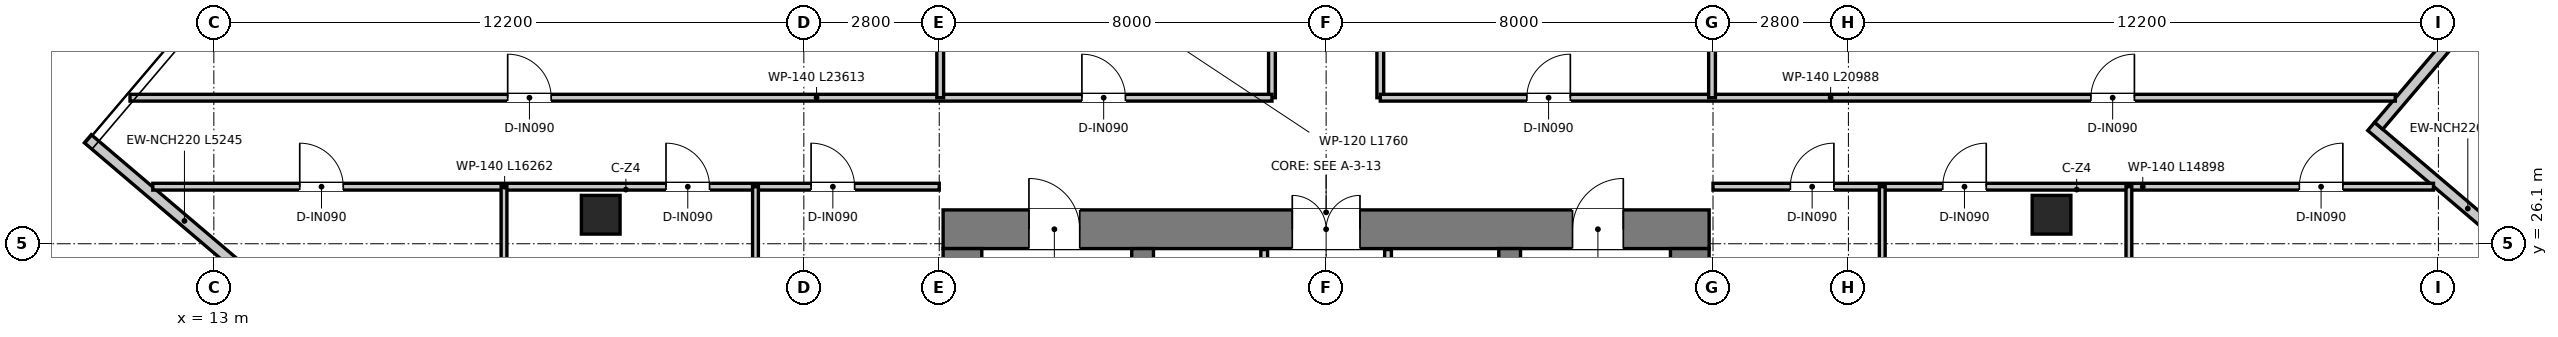
"""IFC4 building model, lengths in metres.
Left out: names, types, materials, properties, quantities, classifications, styles, units other than length and angle.
Written with IfcOpenShell. Run it as: python <this file> out.ifc"""

import sys

from ifc_helpers import new_model, si_unit, direction, frame, frame_2d, origin, origin_2d, place, context, subcontext, project, spatial, rectangle, extrude, source, transform, mapped, element, fill, save


model = new_model("IFC4")
c1 = context("Model", 3, precision=1e-05, world=origin(), true_north=direction((0.0, 1.0)))
c2 = subcontext(c1, "Body", "Model", "MODEL_VIEW")
j1 = project(units=[si_unit("LENGTHUNIT", "METRE"), si_unit("PLANEANGLEUNIT", "RADIAN")], contexts=[c1])
p1 = place(None, origin())
s1 = spatial("IfcSite", under=j1, at=p1, CompositionType="ELEMENT")
p2 = place(p1, origin())
s2 = spatial("IfcBuilding", under=s1, at=p2, CompositionType="ELEMENT")
p3 = place(p2, frame((0.0, 0.0, 211.25)))
s3 = spatial("IfcBuildingStorey", under=s2, at=p3, CompositionType="ELEMENT", Elevation=211.25)
p4 = place(p3, frame((28.08, 26.4, 0.0), z_axis=(0.0, 0.0, 1.0), x_axis=(1.0, 0.0, 0.0)))
e1 = element("IfcWall", 1, at=p4, inside=s3, PredefinedType="SHEAR", context=c2, shape_type="SweptSolid", body=[
    extrude(rectangle(XDim=15.84, YDim=0.8, at=frame_2d((7.92, 0.0))), origin(), (0.0, 0.0, 1.0), 3.95),
])
p5 = place(p4, frame((7.22, 0.0, 0.0)))
e2 = element("IfcOpeningElement", 2, at=p5, cuts=e1, PredefinedType="OPENING", context=c2, shape_type="SweptSolid", body=[
    extrude(rectangle(XDim=1.4, YDim=2.2, at=frame_2d((0.7, 1.1))), frame((0.0, 0.41, 0.0), z_axis=(0.0, -1.0, 0.0), x_axis=(1.0, 0.0, 0.0)), (0.0, 0.0, 1.0), 0.82),
])
p6 = place(p4, frame((1.775, 0.0, 0.0)))
e3 = element("IfcOpeningElement", 3, at=p6, cuts=e1, PredefinedType="OPENING", context=c2, shape_type="SweptSolid", body=[
    extrude(rectangle(XDim=1.05, YDim=2.1, at=frame_2d((0.525, 1.05))), frame((0.0, 0.41, 0.0), z_axis=(0.0, -1.0, 0.0), x_axis=(1.0, 0.0, 0.0)), (0.0, 0.0, 1.0), 0.82),
])
p7 = place(p4, frame((13.015, 0.0, 0.0)))
e4 = element("IfcOpeningElement", 4, at=p7, cuts=e1, PredefinedType="OPENING", context=c2, shape_type="SweptSolid", body=[
    extrude(rectangle(XDim=1.05, YDim=2.1, at=frame_2d((0.525, 1.05))), frame((0.0, 0.41, 0.0), z_axis=(0.0, -1.0, 0.0), x_axis=(1.0, 0.0, 0.0)), (0.0, 0.0, 1.0), 0.82),
])
for number, where, z_axis, x_axis in (
    (5, (28.48, 11.3, 0.0), (0.0, 0.0, 1.0), (0.0, 1.0, 0.0)),
    (6, (43.52, 11.3, 0.0), (0.0, 0.0, 1.0), (0.0, 1.0, 0.0)),
):
    element("IfcWall", number, at=place(p3, frame(where, z_axis=z_axis, x_axis=x_axis)), inside=s3, PredefinedType="SHEAR", context=c2, shape_type="SweptSolid", body=[
        extrude(rectangle(XDim=14.7, YDim=0.8, at=frame_2d((7.35, 0.0))), origin(), (0.0, 0.0, 1.0), 3.95),
    ])
p8 = place(p3, frame((32.205, 13.22, 0.0), z_axis=(0.0, 0.0, 1.0), x_axis=(0.0, 1.0, 0.0)))
e7 = element("IfcWall", 7, at=p8, inside=s3, PredefinedType="SHEAR", context=c2, shape_type="SweptSolid", body=[
    extrude(rectangle(XDim=12.78, YDim=0.45, at=frame_2d((6.39, 0.0))), origin(), (0.0, 0.0, 1.0), 3.95),
])
p9 = place(p8, frame((10.58, 0.0, 0.0)))
e8 = element("IfcOpeningElement", 8, at=p9, cuts=e7, PredefinedType="OPENING", context=c2, shape_type="SweptSolid", body=[
    extrude(rectangle(XDim=1.1, YDim=2.15, at=frame_2d((0.55, 1.075))), frame((0.0, 0.235, 0.0), z_axis=(0.0, -1.0, 0.0), x_axis=(1.0, 0.0, 0.0)), (0.0, 0.0, 1.0), 0.47),
])
p10 = place(p3, frame((39.795, 13.22, 0.0), z_axis=(0.0, 0.0, 1.0), x_axis=(0.0, 1.0, 0.0)))
e9 = element("IfcWall", 9, at=p10, inside=s3, PredefinedType="SHEAR", context=c2, shape_type="SweptSolid", body=[
    extrude(rectangle(XDim=12.78, YDim=0.45, at=frame_2d((6.39, 0.0))), origin(), (0.0, 0.0, 1.0), 3.95),
])
p11 = place(p10, frame((10.58, 0.0, 0.0)))
e10 = element("IfcOpeningElement", 10, at=p11, cuts=e9, PredefinedType="OPENING", context=c2, shape_type="SweptSolid", body=[
    extrude(rectangle(XDim=1.1, YDim=2.15, at=frame_2d((0.55, 1.075))), frame((0.0, 0.235, 0.0), z_axis=(0.0, -1.0, 0.0), x_axis=(1.0, 0.0, 0.0)), (0.0, 0.0, 1.0), 0.47),
])
m1 = source(origin(), c2, "Body", "SweptSolid", [
    extrude(rectangle(XDim=0.8, YDim=0.8, at=origin_2d()), origin(), (0.0, 0.0, 1.0), 3.95),
])
for number, where, z_axis, x_axis in (
    (11, (21.0, 26.7, 0.0), (0.0, 0.0, 1.0), (1.0, 0.0, 0.0)),
    (12, (51.0, 26.7, 0.0), (0.0, 0.0, 1.0), (1.0, 0.0, 0.0)),
):
    element("IfcColumn", number, at=place(p3, frame(where, z_axis=z_axis, x_axis=x_axis)), inside=s3, PredefinedType="COLUMN", context=c2, shape_type="MappedRepresentation", body=[
        mapped(m1, transform((0.0, 0.0, 0.0), x_axis=(1.0, 0.0, 0.0), y_axis=(0.0, 1.0, 0.0), z_axis=(0.0, 0.0, 1.0), scale=1.0)),
    ])
for number, where, z_axis, x_axis in (
    (13, (10.394, 28.271, 0.0), (0.0, 0.0, 1.0), (0.762, -0.648, 0.0)),
    (14, (61.606, 25.129, 0.0), (0.0, 0.0, 1.0), (-0.762, 0.648, 0.0)),
):
    element("IfcWall", number, at=place(p3, frame(where, z_axis=z_axis, x_axis=x_axis)), inside=s3, PredefinedType="ELEMENTEDWALL", context=c2, shape_type="SweptSolid", body=[
        extrude(rectangle(XDim=5.245, YDim=0.22, at=frame_2d((2.623, 0.0))), origin(), (0.0, 0.0, 1.0), 3.67),
    ])
p12 = place(p3, frame((57.765, 28.539, 0.0), z_axis=(0.0, 0.0, 1.0), x_axis=(0.647789440707, 0.761819427757, 0.0)))
e15 = element("IfcWall", 15, at=p12, inside=s3, PredefinedType="ELEMENTEDWALL", context=c2, shape_type="SweptSolid", body=[
    extrude(rectangle(XDim=5.025, YDim=0.22, at=frame_2d((2.512, 0.0))), origin(), (0.0, 0.0, 1.0), 3.67),
])
p13 = place(p3, frame((34.72, 20.2, 0.0), z_axis=(0.0, 0.0, 1.0), x_axis=(0.0, 1.0, 0.0)))
e16 = element("IfcWall", 16, at=p13, inside=s3, PredefinedType="PARTITIONING", context=c2, shape_type="SweptSolid", body=[
    extrude(rectangle(XDim=5.78, YDim=0.14, at=frame_2d((2.89, 0.0))), origin(), (0.0, 0.0, 1.0), 2.67),
])
p14 = place(p13, frame((1.05, 0.0, 0.0)))
e17 = element("IfcOpeningElement", 17, at=p14, cuts=e16, PredefinedType="OPENING", context=c2, shape_type="SweptSolid", body=[
    extrude(rectangle(XDim=0.9, YDim=2.1, at=frame_2d((0.45, 1.05))), frame((0.0, 0.08, 0.0), z_axis=(0.0, -1.0, 0.0), x_axis=(1.0, 0.0, 0.0)), (0.0, 0.0, 1.0), 0.16),
])
p15 = place(p3, frame((37.28, 20.2, 0.0), z_axis=(0.0, 0.0, 1.0), x_axis=(0.0, 1.0, 0.0)))
e18 = element("IfcWall", 18, at=p15, inside=s3, PredefinedType="PARTITIONING", context=c2, shape_type="SweptSolid", body=[
    extrude(rectangle(XDim=5.78, YDim=0.14, at=frame_2d((2.89, 0.0))), origin(), (0.0, 0.0, 1.0), 2.67),
])
p16 = place(p15, frame((0.95, 0.0, 0.0)))
e19 = element("IfcOpeningElement", 19, at=p16, cuts=e18, PredefinedType="OPENING", context=c2, shape_type="SweptSolid", body=[
    extrude(rectangle(XDim=1.1, YDim=2.15, at=frame_2d((0.55, 1.075))), frame((0.0, 0.08, 0.0), z_axis=(0.0, -1.0, 0.0), x_axis=(1.0, 0.0, 0.0)), (0.0, 0.0, 1.0), 0.16),
])
p17 = place(p3, frame((34.88, 29.12, 0.0), z_axis=(0.0, 0.0, 1.0), x_axis=(0.0, 1.0, 0.0)))
e20 = element("IfcWall", 20, at=p17, inside=s3, PredefinedType="PARTITIONING", context=c2, shape_type="SweptSolid", body=[
    extrude(rectangle(XDim=11.76, YDim=0.14, at=frame_2d((5.88, 0.0))), origin(), (0.0, 0.0, 1.0), 3.03),
])
p18 = place(p17, frame((4.085, 0.0, 0.0)))
e21 = element("IfcOpeningElement", 21, at=p18, cuts=e20, PredefinedType="OPENING", context=c2, shape_type="SweptSolid", body=[
    extrude(rectangle(XDim=0.95, YDim=2.1, at=frame_2d((0.475, 1.05))), frame((0.0, 0.08, 0.0), z_axis=(0.0, -1.0, 0.0), x_axis=(1.0, 0.0, 0.0)), (0.0, 0.0, 1.0), 0.16),
])
p19 = place(p17, frame((6.82, 0.0, 0.0)))
e22 = element("IfcOpeningElement", 22, at=p19, cuts=e20, PredefinedType="OPENING", context=c2, shape_type="SweptSolid", body=[
    extrude(rectangle(XDim=0.9, YDim=2.1, at=frame_2d((0.45, 1.05))), frame((0.0, 0.08, 0.0), z_axis=(0.0, -1.0, 0.0), x_axis=(1.0, 0.0, 0.0)), (0.0, 0.0, 1.0), 0.16),
])
p20 = place(p17, frame((9.83, 0.0, 0.0)))
e23 = element("IfcOpeningElement", 23, at=p20, cuts=e20, PredefinedType="OPENING", context=c2, shape_type="SweptSolid", body=[
    extrude(rectangle(XDim=0.9, YDim=2.1, at=frame_2d((0.45, 1.05))), frame((0.0, 0.08, 0.0), z_axis=(0.0, -1.0, 0.0), x_axis=(1.0, 0.0, 0.0)), (0.0, 0.0, 1.0), 0.16),
])
p21 = place(p3, frame((37.12, 29.12, 0.0), z_axis=(0.0, 0.0, 1.0), x_axis=(0.0, 1.0, 0.0)))
e24 = element("IfcWall", 24, at=p21, inside=s3, PredefinedType="PARTITIONING", context=c2, shape_type="SweptSolid", body=[
    extrude(rectangle(XDim=11.76, YDim=0.14, at=frame_2d((5.88, 0.0))), origin(), (0.0, 0.0, 1.0), 3.03),
])
p22 = place(p21, frame((3.205, 0.0, 0.0)))
e25 = element("IfcOpeningElement", 25, at=p22, cuts=e24, PredefinedType="OPENING", context=c2, shape_type="SweptSolid", body=[
    extrude(rectangle(XDim=0.95, YDim=2.1, at=frame_2d((0.475, 1.05))), frame((0.0, 0.08, 0.0), z_axis=(0.0, -1.0, 0.0), x_axis=(1.0, 0.0, 0.0)), (0.0, 0.0, 1.0), 0.16),
])
p23 = place(p21, frame((6.82, 0.0, 0.0)))
e26 = element("IfcOpeningElement", 26, at=p23, cuts=e24, PredefinedType="OPENING", context=c2, shape_type="SweptSolid", body=[
    extrude(rectangle(XDim=0.9, YDim=2.1, at=frame_2d((0.45, 1.05))), frame((0.0, 0.08, 0.0), z_axis=(0.0, -1.0, 0.0), x_axis=(1.0, 0.0, 0.0)), (0.0, 0.0, 1.0), 0.16),
])
p24 = place(p21, frame((9.83, 0.0, 0.0)))
e27 = element("IfcOpeningElement", 27, at=p24, cuts=e24, PredefinedType="OPENING", context=c2, shape_type="SweptSolid", body=[
    extrude(rectangle(XDim=0.9, YDim=2.1, at=frame_2d((0.45, 1.05))), frame((0.0, 0.08, 0.0), z_axis=(0.0, -1.0, 0.0), x_axis=(1.0, 0.0, 0.0)), (0.0, 0.0, 1.0), 0.16),
])
p25 = place(p3, frame((11.267, 29.12, 0.0), z_axis=(0.0, 0.0, 1.0), x_axis=(1.0, 0.0, 0.0)))
e28 = element("IfcWall", 28, at=p25, inside=s3, PredefinedType="PARTITIONING", context=c2, shape_type="SweptSolid", body=[
    extrude(rectangle(XDim=23.613, YDim=0.14, at=frame_2d((11.807, 0.0))), origin(), (0.0, 0.0, 1.0), 3.03),
])
p26 = place(p25, frame((19.683, 0.0, 0.0)))
e29 = element("IfcOpeningElement", 29, at=p26, cuts=e28, PredefinedType="OPENING", context=c2, shape_type="SweptSolid", body=[
    extrude(rectangle(XDim=0.9, YDim=2.1, at=frame_2d((0.45, 1.05))), frame((0.0, 0.08, 0.0), z_axis=(0.0, -1.0, 0.0), x_axis=(1.0, 0.0, 0.0)), (0.0, 0.0, 1.0), 0.16),
])
p27 = place(p25, frame((7.809, 0.0, 0.0)))
e30 = element("IfcOpeningElement", 30, at=p27, cuts=e28, PredefinedType="OPENING", context=c2, shape_type="SweptSolid", body=[
    extrude(rectangle(XDim=0.9, YDim=2.1, at=frame_2d((0.45, 1.05))), frame((0.0, 0.08, 0.0), z_axis=(0.0, -1.0, 0.0), x_axis=(1.0, 0.0, 0.0)), (0.0, 0.0, 1.0), 0.16),
])
p28 = place(p3, frame((37.12, 29.12, 0.0), z_axis=(0.0, 0.0, 1.0), x_axis=(1.0, 0.0, 0.0)))
e31 = element("IfcWall", 31, at=p28, inside=s3, PredefinedType="PARTITIONING", context=c2, shape_type="SweptSolid", body=[
    extrude(rectangle(XDim=20.988, YDim=0.14, at=frame_2d((10.494, 0.0))), origin(), (0.0, 0.0, 1.0), 3.03),
])
p29 = place(p28, frame((3.03, 0.0, 0.0)))
e32 = element("IfcOpeningElement", 32, at=p29, cuts=e31, PredefinedType="OPENING", context=c2, shape_type="SweptSolid", body=[
    extrude(rectangle(XDim=0.9, YDim=2.1, at=frame_2d((0.45, 1.05))), frame((0.0, 0.08, 0.0), z_axis=(0.0, -1.0, 0.0), x_axis=(1.0, 0.0, 0.0)), (0.0, 0.0, 1.0), 0.16),
])
p30 = place(p28, frame((14.694, 0.0, 0.0)))
e33 = element("IfcOpeningElement", 33, at=p30, cuts=e31, PredefinedType="OPENING", context=c2, shape_type="SweptSolid", body=[
    extrude(rectangle(XDim=0.9, YDim=2.1, at=frame_2d((0.45, 1.05))), frame((0.0, 0.08, 0.0), z_axis=(0.0, -1.0, 0.0), x_axis=(1.0, 0.0, 0.0)), (0.0, 0.0, 1.0), 0.16),
])
p31 = place(p3, frame((11.738, 27.28, 0.0), z_axis=(0.0, 0.0, 1.0), x_axis=(1.0, 0.0, 0.0)))
e34 = element("IfcWall", 34, at=p31, inside=s3, PredefinedType="PARTITIONING", context=c2, shape_type="SweptSolid", body=[
    extrude(rectangle(XDim=16.262, YDim=0.14, at=frame_2d((8.131, 0.0))), origin(), (0.0, 0.0, 1.0), 3.03),
])
p32 = place(p31, frame((3.038, 0.0, 0.0)))
e35 = element("IfcOpeningElement", 35, at=p32, cuts=e34, PredefinedType="OPENING", context=c2, shape_type="SweptSolid", body=[
    extrude(rectangle(XDim=0.9, YDim=2.1, at=frame_2d((0.45, 1.05))), frame((0.0, 0.08, 0.0), z_axis=(0.0, -1.0, 0.0), x_axis=(1.0, 0.0, 0.0)), (0.0, 0.0, 1.0), 0.16),
])
p33 = place(p31, frame((10.612, 0.0, 0.0)))
e36 = element("IfcOpeningElement", 36, at=p33, cuts=e34, PredefinedType="OPENING", context=c2, shape_type="SweptSolid", body=[
    extrude(rectangle(XDim=0.9, YDim=2.1, at=frame_2d((0.45, 1.05))), frame((0.0, 0.08, 0.0), z_axis=(0.0, -1.0, 0.0), x_axis=(1.0, 0.0, 0.0)), (0.0, 0.0, 1.0), 0.16),
])
p34 = place(p31, frame((13.612, 0.0, 0.0)))
e37 = element("IfcOpeningElement", 37, at=p34, cuts=e34, PredefinedType="OPENING", context=c2, shape_type="SweptSolid", body=[
    extrude(rectangle(XDim=0.9, YDim=2.1, at=frame_2d((0.45, 1.05))), frame((0.0, 0.08, 0.0), z_axis=(0.0, -1.0, 0.0), x_axis=(1.0, 0.0, 0.0)), (0.0, 0.0, 1.0), 0.16),
])
p35 = place(p3, frame((44.0, 27.28, 0.0), z_axis=(0.0, 0.0, 1.0), x_axis=(1.0, 0.0, 0.0)))
e38 = element("IfcWall", 38, at=p35, inside=s3, PredefinedType="PARTITIONING", context=c2, shape_type="SweptSolid", body=[
    extrude(rectangle(XDim=14.898, YDim=0.14, at=frame_2d((7.449, 0.0))), origin(), (0.0, 0.0, 1.0), 3.03),
])
p36 = place(p35, frame((1.6, 0.0, 0.0)))
e39 = element("IfcOpeningElement", 39, at=p36, cuts=e38, PredefinedType="OPENING", context=c2, shape_type="SweptSolid", body=[
    extrude(rectangle(XDim=0.9, YDim=2.1, at=frame_2d((0.45, 1.05))), frame((0.0, 0.08, 0.0), z_axis=(0.0, -1.0, 0.0), x_axis=(1.0, 0.0, 0.0)), (0.0, 0.0, 1.0), 0.16),
])
p37 = place(p35, frame((4.75, 0.0, 0.0)))
e40 = element("IfcOpeningElement", 40, at=p37, cuts=e38, PredefinedType="OPENING", context=c2, shape_type="SweptSolid", body=[
    extrude(rectangle(XDim=0.9, YDim=2.1, at=frame_2d((0.45, 1.05))), frame((0.0, 0.08, 0.0), z_axis=(0.0, -1.0, 0.0), x_axis=(1.0, 0.0, 0.0)), (0.0, 0.0, 1.0), 0.16),
])
p38 = place(p35, frame((12.124, 0.0, 0.0)))
e41 = element("IfcOpeningElement", 41, at=p38, cuts=e38, PredefinedType="OPENING", context=c2, shape_type="SweptSolid", body=[
    extrude(rectangle(XDim=0.9, YDim=2.1, at=frame_2d((0.45, 1.05))), frame((0.0, 0.08, 0.0), z_axis=(0.0, -1.0, 0.0), x_axis=(1.0, 0.0, 0.0)), (0.0, 0.0, 1.0), 0.16),
])
for number, where, z_axis, x_axis in (
    (42, (28.02, 29.12, 0.0), (0.0, 0.0, 1.0), (0.0, 1.0, 0.0)),
    (43, (43.98, 29.12, 0.0), (0.0, 0.0, 1.0), (0.0, 1.0, 0.0)),
):
    element("IfcWall", number, at=place(p3, frame(where, z_axis=z_axis, x_axis=x_axis)), inside=s3, PredefinedType="PARTITIONING", context=c2, shape_type="SweptSolid", body=[
        extrude(rectangle(XDim=5.46, YDim=0.14, at=frame_2d((2.73, 0.0))), origin(), (0.0, 0.0, 1.0), 3.37),
    ])
p39 = place(p3, frame((19.0, 14.364, 0.0), z_axis=(0.0, 0.0, 1.0), x_axis=(0.0, 1.0, 0.0)))
e44 = element("IfcWall", 44, at=p39, inside=s3, PredefinedType="PARTITIONING", context=c2, shape_type="SweptSolid", body=[
    extrude(rectangle(XDim=12.916, YDim=0.12, at=frame_2d((6.458, 0.0))), origin(), (0.0, 0.0, 1.0), 3.67),
])
p40 = place(p3, frame((24.2, 9.943, 0.0), z_axis=(0.0, 0.0, 1.0), x_axis=(0.0, 1.0, 0.0)))
e45 = element("IfcWall", 45, at=p40, inside=s3, PredefinedType="PARTITIONING", context=c2, shape_type="SweptSolid", body=[
    extrude(rectangle(XDim=17.337, YDim=0.12, at=frame_2d((8.669, 0.0))), origin(), (0.0, 0.0, 1.0), 3.18),
])
p41 = place(p3, frame((47.5, 8.717, 0.0), z_axis=(0.0, 0.0, 1.0), x_axis=(0.0, 1.0, 0.0)))
e46 = element("IfcWall", 46, at=p41, inside=s3, PredefinedType="PARTITIONING", context=c2, shape_type="SweptSolid", body=[
    extrude(rectangle(XDim=18.563, YDim=0.12, at=frame_2d((9.281, 0.0))), origin(), (0.0, 0.0, 1.0), 3.18),
])
p42 = place(p3, frame((52.6, 14.715, 0.0), z_axis=(0.0, 0.0, 1.0), x_axis=(0.0, 1.0, 0.0)))
e47 = element("IfcWall", 47, at=p42, inside=s3, PredefinedType="PARTITIONING", context=c2, shape_type="SweptSolid", body=[
    extrude(rectangle(XDim=12.565, YDim=0.12, at=frame_2d((6.283, 0.0))), origin(), (0.0, 0.0, 1.0), 3.67),
])
p43 = place(p5, origin())
e48 = element("IfcDoor", 48, at=p43, inside=s3, OperationType="DOUBLE_DOOR_SINGLE_SWING", PredefinedType="DOOR", context=c2, shape_type="SweptSolid", body=[
    extrude(rectangle(XDim=1.4, YDim=2.2, at=frame_2d((0.7, 1.1))), frame((0.0, 0.025, 0.0), z_axis=(0.0, -1.0, 0.0), x_axis=(1.0, 0.0, 0.0)), (0.0, 0.0, 1.0), 0.05),
])
fill(e2, e48)
p44 = place(p6, origin())
e49 = element("IfcDoor", 49, at=p44, inside=s3, OperationType="SINGLE_SWING_LEFT", PredefinedType="DOOR", context=c2, shape_type="SweptSolid", body=[
    extrude(rectangle(XDim=1.05, YDim=2.1, at=frame_2d((0.525, 1.05))), frame((0.0, 0.025, 0.0), z_axis=(0.0, -1.0, 0.0), x_axis=(1.0, 0.0, 0.0)), (0.0, 0.0, 1.0), 0.05),
])
fill(e3, e49)
p45 = place(p7, origin())
e50 = element("IfcDoor", 50, at=p45, inside=s3, OperationType="SINGLE_SWING_RIGHT", PredefinedType="DOOR", context=c2, shape_type="SweptSolid", body=[
    extrude(rectangle(XDim=1.05, YDim=2.1, at=frame_2d((0.525, 1.05))), frame((0.0, 0.025, 0.0), z_axis=(0.0, -1.0, 0.0), x_axis=(1.0, 0.0, 0.0)), (0.0, 0.0, 1.0), 0.05),
])
fill(e4, e50)
p46 = place(p26, origin())
e51 = element("IfcDoor", 51, at=p46, inside=s3, OperationType="SINGLE_SWING_LEFT", PredefinedType="DOOR", context=c2, shape_type="SweptSolid", body=[
    extrude(rectangle(XDim=0.9, YDim=2.1, at=frame_2d((0.45, 1.05))), frame((0.0, 0.025, 0.0), z_axis=(0.0, -1.0, 0.0), x_axis=(1.0, 0.0, 0.0)), (0.0, 0.0, 1.0), 0.05),
])
fill(e29, e51)
p47 = place(p29, origin())
e52 = element("IfcDoor", 52, at=p47, inside=s3, OperationType="SINGLE_SWING_RIGHT", PredefinedType="DOOR", context=c2, shape_type="SweptSolid", body=[
    extrude(rectangle(XDim=0.9, YDim=2.1, at=frame_2d((0.45, 1.05))), frame((0.0, 0.025, 0.0), z_axis=(0.0, -1.0, 0.0), x_axis=(1.0, 0.0, 0.0)), (0.0, 0.0, 1.0), 0.05),
])
fill(e32, e52)
p48 = place(p27, origin())
e53 = element("IfcDoor", 53, at=p48, inside=s3, OperationType="SINGLE_SWING_LEFT", PredefinedType="DOOR", context=c2, shape_type="SweptSolid", body=[
    extrude(rectangle(XDim=0.9, YDim=2.1, at=frame_2d((0.45, 1.05))), frame((0.0, 0.025, 0.0), z_axis=(0.0, -1.0, 0.0), x_axis=(1.0, 0.0, 0.0)), (0.0, 0.0, 1.0), 0.05),
])
fill(e30, e53)
p49 = place(p30, origin())
e54 = element("IfcDoor", 54, at=p49, inside=s3, OperationType="SINGLE_SWING_RIGHT", PredefinedType="DOOR", context=c2, shape_type="SweptSolid", body=[
    extrude(rectangle(XDim=0.9, YDim=2.1, at=frame_2d((0.45, 1.05))), frame((0.0, 0.025, 0.0), z_axis=(0.0, -1.0, 0.0), x_axis=(1.0, 0.0, 0.0)), (0.0, 0.0, 1.0), 0.05),
])
fill(e33, e54)
p50 = place(p32, origin())
e55 = element("IfcDoor", 55, at=p50, inside=s3, OperationType="SINGLE_SWING_LEFT", PredefinedType="DOOR", context=c2, shape_type="SweptSolid", body=[
    extrude(rectangle(XDim=0.9, YDim=2.1, at=frame_2d((0.45, 1.05))), frame((0.0, 0.025, 0.0), z_axis=(0.0, -1.0, 0.0), x_axis=(1.0, 0.0, 0.0)), (0.0, 0.0, 1.0), 0.05),
])
fill(e35, e55)
p51 = place(p33, origin())
e56 = element("IfcDoor", 56, at=p51, inside=s3, OperationType="SINGLE_SWING_LEFT", PredefinedType="DOOR", context=c2, shape_type="SweptSolid", body=[
    extrude(rectangle(XDim=0.9, YDim=2.1, at=frame_2d((0.45, 1.05))), frame((0.0, 0.025, 0.0), z_axis=(0.0, -1.0, 0.0), x_axis=(1.0, 0.0, 0.0)), (0.0, 0.0, 1.0), 0.05),
])
fill(e36, e56)
p52 = place(p34, origin())
e57 = element("IfcDoor", 57, at=p52, inside=s3, OperationType="SINGLE_SWING_LEFT", PredefinedType="DOOR", context=c2, shape_type="SweptSolid", body=[
    extrude(rectangle(XDim=0.9, YDim=2.1, at=frame_2d((0.45, 1.05))), frame((0.0, 0.025, 0.0), z_axis=(0.0, -1.0, 0.0), x_axis=(1.0, 0.0, 0.0)), (0.0, 0.0, 1.0), 0.05),
])
fill(e37, e57)
p53 = place(p36, origin())
e58 = element("IfcDoor", 58, at=p53, inside=s3, OperationType="SINGLE_SWING_RIGHT", PredefinedType="DOOR", context=c2, shape_type="SweptSolid", body=[
    extrude(rectangle(XDim=0.9, YDim=2.1, at=frame_2d((0.45, 1.05))), frame((0.0, 0.025, 0.0), z_axis=(0.0, -1.0, 0.0), x_axis=(1.0, 0.0, 0.0)), (0.0, 0.0, 1.0), 0.05),
])
fill(e39, e58)
p54 = place(p37, origin())
e59 = element("IfcDoor", 59, at=p54, inside=s3, OperationType="SINGLE_SWING_RIGHT", PredefinedType="DOOR", context=c2, shape_type="SweptSolid", body=[
    extrude(rectangle(XDim=0.9, YDim=2.1, at=frame_2d((0.45, 1.05))), frame((0.0, 0.025, 0.0), z_axis=(0.0, -1.0, 0.0), x_axis=(1.0, 0.0, 0.0)), (0.0, 0.0, 1.0), 0.05),
])
fill(e40, e59)
p55 = place(p38, origin())
e60 = element("IfcDoor", 60, at=p55, inside=s3, OperationType="SINGLE_SWING_RIGHT", PredefinedType="DOOR", context=c2, shape_type="SweptSolid", body=[
    extrude(rectangle(XDim=0.9, YDim=2.1, at=frame_2d((0.45, 1.05))), frame((0.0, 0.025, 0.0), z_axis=(0.0, -1.0, 0.0), x_axis=(1.0, 0.0, 0.0)), (0.0, 0.0, 1.0), 0.05),
])
fill(e41, e60)
save(model, sys.argv[1])
